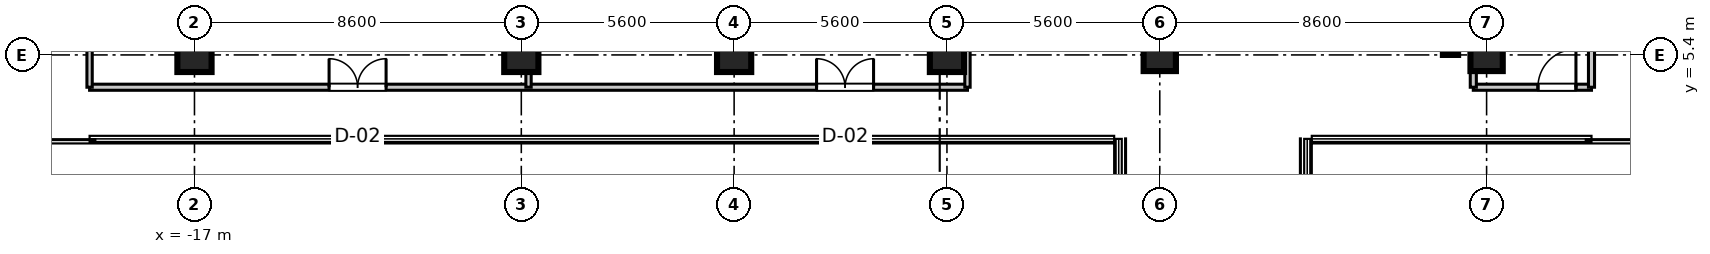
"""IFC4 building model, lengths in metres.
Left out: names, types, materials, properties, quantities, classifications, styles, units other than length and angle.
Written with IfcOpenShell. Run it as: python <this file> out.ifc"""

import sys

from ifc_helpers import new_model, si_unit, direction, frame, frame_2d, origin, origin_2d, place, context, subcontext, project, spatial, rectangle, extrude, source, transform, mapped, element, fill, save


model = new_model("IFC4")
c1 = context("Model", 3, precision=1e-05, world=origin(), true_north=direction((0.0, 1.0)))
c2 = subcontext(c1, "Body", "Model", "MODEL_VIEW")
j1 = project(units=[si_unit("LENGTHUNIT", "METRE"), si_unit("PLANEANGLEUNIT", "RADIAN")], contexts=[c1])
p1 = place(None, origin())
s1 = spatial("IfcSite", under=j1, at=p1, CompositionType="ELEMENT")
p2 = place(p1, origin())
s2 = spatial("IfcBuilding", under=s1, at=p2, CompositionType="ELEMENT")
p3 = place(p2, frame((0.0, 0.0, 311.9)))
s3 = spatial("IfcBuildingStorey", under=s2, at=p3, CompositionType="ELEMENT", Elevation=311.9)
m1 = source(origin(), c2, "Body", "SweptSolid", [
    extrude(rectangle(XDim=0.9, YDim=0.9, at=origin_2d()), origin(), (0.0, 0.0, 1.0), 3.805),
])
for number, where, z_axis, x_axis in (
    (1, (-17.0, 5.4, 0.0), (0.0, 0.0, 1.0), (1.0, 0.0, 0.0)),
    (2, (-8.4, 5.4, 0.0), (0.0, 0.0, 1.0), (1.0, 0.0, 0.0)),
    (3, (-2.8, 5.4, 0.0), (0.0, 0.0, 1.0), (1.0, 0.0, 0.0)),
    (4, (2.8, 5.4, 0.0), (0.0, 0.0, 1.0), (1.0, 0.0, 0.0)),
):
    element("IfcColumn", number, at=place(p3, frame(where, z_axis=z_axis, x_axis=x_axis)), inside=s3, PredefinedType="COLUMN", context=c2, shape_type="MappedRepresentation", body=[
        mapped(m1, transform((0.0, 0.0, 0.0), scale=1.0)),
    ])
m2 = source(origin(), c2, "Body", "SweptSolid", [
    extrude(rectangle(XDim=0.85, YDim=0.85, at=origin_2d()), origin(), (0.0, 0.0, 1.0), 3.805),
])
for number, where, z_axis, x_axis in (
    (5, (8.4, 5.4, 0.0), (0.0, 0.0, 1.0), (1.0, 0.0, 0.0)),
    (6, (17.0, 5.4, 0.0), (0.0, 0.0, 1.0), (1.0, 0.0, 0.0)),
):
    element("IfcColumn", number, at=place(p3, frame(where, z_axis=z_axis, x_axis=x_axis)), inside=s3, PredefinedType="PILASTER", context=c2, shape_type="MappedRepresentation", body=[
        mapped(m2, transform((0.0, 0.0, 0.0), scale=1.0)),
    ])
m3 = source(origin(), c2, "Body", "SweptSolid", [
    extrude(rectangle(XDim=11.6, YDim=0.4, at=frame_2d((5.8, 0.0))), origin(), (0.0, 0.0, 1.0), 3.55),
])
p4 = place(p3, frame((16.05, 5.4, 0.0), z_axis=(0.0, 0.0, 1.0), x_axis=(0.0, 1.0, 0.0)))
e7 = element("IfcWall", 7, at=p4, inside=s3, PredefinedType="SHEAR", context=c2, shape_type="MappedRepresentation", body=[
    mapped(m3, transform((0.0, 0.0, 0.0), scale=1.0)),
])
m4 = source(origin(), c2, "Body", "SweptSolid", [
    extrude(rectangle(XDim=3.11, YDim=0.16, at=frame_2d((1.555, 0.0))), origin(), (0.0, 0.0, 1.0), 2.89),
])
p5 = place(p3, frame((16.65, 4.55, 0.0), z_axis=(0.0, 0.0, 1.0), x_axis=(1.0, 0.0, 0.0)))
e8 = element("IfcWall", 8, at=p5, inside=s3, PredefinedType="PARTITIONING", context=c2, shape_type="MappedRepresentation", body=[
    mapped(m4, transform((0.0, 0.0, 0.0), scale=1.0)),
])
p6 = place(p5, frame((1.701, 0.0, 0.0)))
e9 = element("IfcOpeningElement", 9, at=p6, cuts=e8, PredefinedType="OPENING", context=c2, shape_type="SweptSolid", body=[
    extrude(rectangle(XDim=1.0, YDim=2.1, at=frame_2d((0.5, 1.05))), frame((0.0, 0.09, 0.0), z_axis=(0.0, -1.0, 0.0), x_axis=(1.0, 0.0, 0.0)), (0.0, 0.0, 1.0), 0.18),
])
m5 = source(origin(), c2, "Body", "SweptSolid", [
    extrude(rectangle(XDim=17.95, YDim=0.16, at=frame_2d((8.975, 0.0))), origin(), (0.0, 0.0, 1.0), 2.89),
])
p7 = place(p3, frame((16.65, 4.55, 0.0), z_axis=(0.0, 0.0, 1.0), x_axis=(0.0, 1.0, 0.0)))
e10 = element("IfcWall", 10, at=p7, inside=s3, PredefinedType="PARTITIONING", context=c2, shape_type="MappedRepresentation", body=[
    mapped(m5, transform((0.0, 0.0, 0.0), scale=1.0)),
])
m6 = source(origin(), c2, "Body", "SweptSolid", [
    extrude(rectangle(XDim=16.53, YDim=0.16, at=frame_2d((8.265, 0.0))), origin(), (0.0, 0.0, 1.0), 2.89),
])
p8 = place(p3, frame((19.76, 4.55, 0.0), z_axis=(0.0, 0.0, 1.0), x_axis=(0.0, 1.0, 0.0)))
e11 = element("IfcWall", 11, at=p8, inside=s3, PredefinedType="PARTITIONING", context=c2, shape_type="MappedRepresentation", body=[
    mapped(m6, transform((0.0, 0.0, 0.0), scale=1.0)),
])
m7 = source(origin(), c2, "Body", "SweptSolid", [
    extrude(rectangle(XDim=23.1, YDim=0.16, at=frame_2d((11.55, 0.0))), origin(), (0.0, 0.0, 1.0), 2.89),
])
p9 = place(p3, frame((-19.76, 4.55, 0.0), z_axis=(0.0, 0.0, 1.0), x_axis=(1.0, 0.0, 0.0)))
e12 = element("IfcWall", 12, at=p9, inside=s3, PredefinedType="PARTITIONING", context=c2, shape_type="MappedRepresentation", body=[
    mapped(m7, transform((0.0, 0.0, 0.0), scale=1.0)),
])
p10 = place(p9, frame((6.302, 0.0, 0.0)))
e13 = element("IfcOpeningElement", 13, at=p10, cuts=e12, PredefinedType="OPENING", context=c2, shape_type="SweptSolid", body=[
    extrude(rectangle(XDim=1.5, YDim=2.15, at=frame_2d((0.75, 1.075))), frame((0.0, 0.09, 0.0), z_axis=(0.0, -1.0, 0.0), x_axis=(1.0, 0.0, 0.0)), (0.0, 0.0, 1.0), 0.18),
])
p11 = place(p9, frame((19.129, 0.0, 0.0)))
e14 = element("IfcOpeningElement", 14, at=p11, cuts=e12, PredefinedType="OPENING", context=c2, shape_type="SweptSolid", body=[
    extrude(rectangle(XDim=1.5, YDim=2.15, at=frame_2d((0.75, 1.075))), frame((0.0, 0.09, 0.0), z_axis=(0.0, -1.0, 0.0), x_axis=(1.0, 0.0, 0.0)), (0.0, 0.0, 1.0), 0.18),
])
m8 = source(origin(), c2, "Body", "SweptSolid", [
    extrude(rectangle(XDim=16.53, YDim=0.14, at=frame_2d((8.265, 0.0))), origin(), (0.0, 0.0, 1.0), 2.89),
])
p12 = place(p3, frame((-19.76, 4.55, 0.0), z_axis=(0.0, 0.0, 1.0), x_axis=(0.0, 1.0, 0.0)))
e15 = element("IfcWall", 15, at=p12, inside=s3, PredefinedType="PARTITIONING", context=c2, shape_type="MappedRepresentation", body=[
    mapped(m8, transform((0.0, 0.0, 0.0), scale=1.0)),
])
m9 = source(origin(), c2, "Body", "SweptSolid", [
    extrude(rectangle(XDim=17.95, YDim=0.14, at=frame_2d((8.975, 0.0))), origin(), (0.0, 0.0, 1.0), 2.89),
])
for number, where, z_axis, x_axis in (
    (16, (3.34, 4.55, 0.0), (0.0, 0.0, 1.0), (0.0, 1.0, 0.0)),
    (17, (-8.21, 4.55, 0.0), (0.0, 0.0, 1.0), (0.0, 1.0, 0.0)),
):
    element("IfcWall", number, at=place(p3, frame(where, z_axis=z_axis, x_axis=x_axis)), inside=s3, PredefinedType="PARTITIONING", context=c2, shape_type="MappedRepresentation", body=[
        mapped(m9, transform((0.0, 0.0, 0.0), scale=1.0)),
    ])
m10 = source(origin(), c2, "Body", "SweptSolid", [
    extrude(rectangle(XDim=1.0, YDim=2.1, at=frame_2d((0.5, 1.05))), frame((0.0, 0.025, 0.0), z_axis=(0.0, -1.0, 0.0), x_axis=(1.0, 0.0, 0.0)), (0.0, 0.0, 1.0), 0.05),
])
p13 = place(p6, origin())
e18 = element("IfcDoor", 18, at=p13, inside=s3, OperationType="SINGLE_SWING_RIGHT", PredefinedType="DOOR", context=c2, shape_type="MappedRepresentation", body=[
    mapped(m10, transform((0.0, 0.0, 0.0), scale=1.0)),
])
fill(e9, e18)
m11 = source(origin(), c2, "Body", "SweptSolid", [
    extrude(rectangle(XDim=1.5, YDim=2.15, at=frame_2d((0.75, 1.075))), frame((0.0, 0.025, 0.0), z_axis=(0.0, -1.0, 0.0), x_axis=(1.0, 0.0, 0.0)), (0.0, 0.0, 1.0), 0.05),
])
p14 = place(p10, origin())
e19 = element("IfcDoor", 19, at=p14, inside=s3, OperationType="DOUBLE_DOOR_SINGLE_SWING", PredefinedType="DOOR", context=c2, shape_type="MappedRepresentation", body=[
    mapped(m11, transform((0.0, 0.0, 0.0), scale=1.0)),
])
fill(e13, e19)
p15 = place(p11, origin())
e20 = element("IfcDoor", 20, at=p15, inside=s3, OperationType="DOUBLE_DOOR_SINGLE_SWING", PredefinedType="DOOR", context=c2, shape_type="MappedRepresentation", body=[
    mapped(m11, transform((0.0, 0.0, 0.0), scale=1.0)),
])
fill(e14, e20)
save(model, sys.argv[1])
